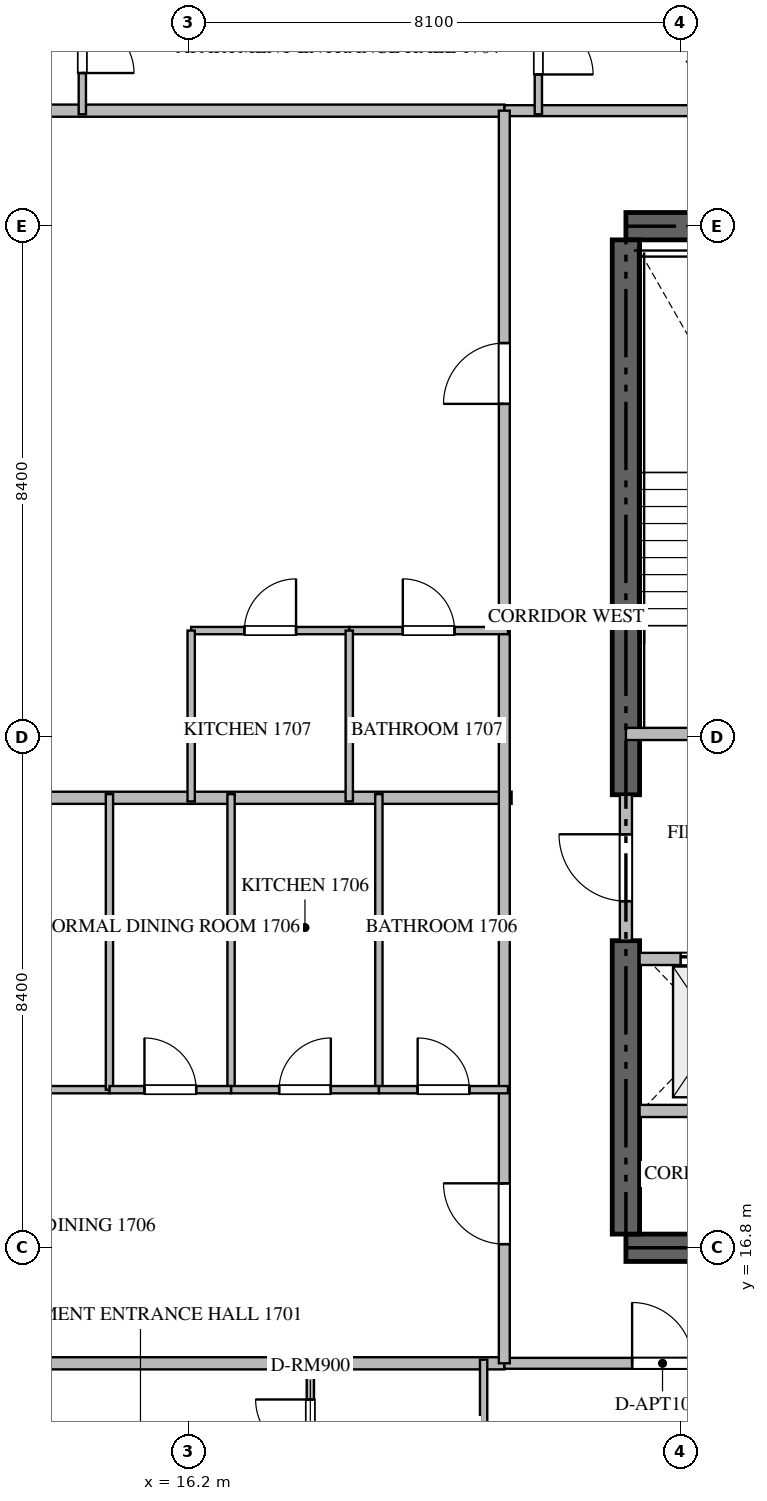
"""IFC4 building model, lengths in metres.
Left out: names, types, materials, properties, quantities, classifications, styles, units other than length and angle.
Written with IfcOpenShell. Run it as: python <this file> out.ifc"""

import sys

from ifc_helpers import new_model, si_unit, direction, frame, frame_2d, origin, place, context, subcontext, project, spatial, rectangle, extrude, source, transform, mapped, element, fill, save


model = new_model("IFC4")
c1 = context("Model", 3, precision=1e-05, world=origin(), true_north=direction((0.0, 1.0)))
c2 = subcontext(c1, "Body", "Model", "MODEL_VIEW")
j1 = project(units=[si_unit("LENGTHUNIT", "METRE"), si_unit("PLANEANGLEUNIT", "RADIAN")], contexts=[c1])
p1 = place(None, origin())
s1 = spatial("IfcSite", under=j1, at=p1, CompositionType="ELEMENT")
p2 = place(p1, origin())
s2 = spatial("IfcBuilding", under=s1, at=p2, CompositionType="ELEMENT")
p3 = place(p2, frame((0.0, 0.0, 71.7)))
s3 = spatial("IfcBuildingStorey", under=s2, at=p3, CompositionType="ELEMENT", Elevation=71.7)
for number, where, z_axis, x_axis in (
    (1, (23.4, 16.8, -0.26), (0.0, 0.0, 1.0), (1.0, 0.0, 0.0)),
    (2, (41.4, 33.6, -0.26), (0.0, 0.0, 1.0), (-1.0, 0.0, 0.0)),
):
    element("IfcWall", number, at=place(p3, frame(where, z_axis=z_axis, x_axis=x_axis)), inside=s3, PredefinedType="SHEAR", context=c2, shape_type="SweptSolid", body=[
        extrude(rectangle(XDim=18.0, YDim=0.45, at=frame_2d((9.0, 0.0))), origin(), (0.0, 0.0, 1.0), 3.748),
    ])
p4 = place(p3, frame((23.4, 17.025, -0.26), z_axis=(0.0, 0.0, 1.0), x_axis=(0.0, 1.0, 0.0)))
e3 = element("IfcWall", 3, at=p4, inside=s3, PredefinedType="SHEAR", context=c2, shape_type="SweptSolid", body=[
    extrude(rectangle(XDim=4.825, YDim=0.45, at=frame_2d((2.413, 0.0))), origin(), (0.0, 0.0, 1.0), 3.748),
])
p5 = place(p3, frame((23.4, 24.25, -0.26), z_axis=(0.0, 0.0, 1.0), x_axis=(0.0, 1.0, 0.0)))
e4 = element("IfcWall", 4, at=p5, inside=s3, PredefinedType="SHEAR", context=c2, shape_type="SweptSolid", body=[
    extrude(rectangle(XDim=9.125, YDim=0.45, at=frame_2d((4.562, 0.0))), origin(), (0.0, 0.0, 1.0), 3.748),
])
p6 = place(p3, frame((23.4, 25.25, 0.0), z_axis=(0.0, 0.0, 1.0), x_axis=(1.0, 0.0, 0.0)))
e5 = element("IfcWall", 5, at=p6, inside=s3, PredefinedType="STANDARD", context=c2, shape_type="SweptSolid", body=[
    extrude(rectangle(XDim=4.45, YDim=0.2, at=frame_2d((2.225, 0.0))), origin(), (0.0, 0.0, 1.0), 3.49),
])
p7 = place(p6, frame((1.65, 0.0, 0.0)))
e6 = element("IfcOpeningElement", 6, at=p7, cuts=e5, PredefinedType="OPENING", context=c2, shape_type="SweptSolid", body=[
    extrude(rectangle(XDim=1.1, YDim=2.15, at=frame_2d((0.55, 1.075))), frame((0.0, 0.11, 0.0), z_axis=(0.0, -1.0, 0.0), x_axis=(1.0, 0.0, 0.0)), (0.0, 0.0, 1.0), 0.22),
])
p8 = place(p3, frame((23.625, 21.55, 0.0), z_axis=(0.0, 0.0, 1.0), x_axis=(1.0, 0.0, 0.0)))
e7 = element("IfcWall", 7, at=p8, inside=s3, PredefinedType="STANDARD", context=c2, shape_type="SweptSolid", body=[
    extrude(rectangle(XDim=2.425, YDim=0.2, at=frame_2d((1.212, 0.0))), origin(), (0.0, 0.0, 1.0), 3.49),
])
p9 = place(p8, frame((0.675, 0.0, 0.0)))
e8 = element("IfcOpeningElement", 8, at=p9, cuts=e7, PredefinedType="OPENING", context=c2, shape_type="SweptSolid", body=[
    extrude(rectangle(XDim=1.2, YDim=2.2, at=frame_2d((0.6, 1.1))), frame((0.0, 0.11, 0.0), z_axis=(0.0, -1.0, 0.0), x_axis=(1.0, 0.0, 0.0)), (0.0, 0.0, 1.0), 0.22),
])
p10 = place(p3, frame((23.625, 19.05, 0.0), z_axis=(0.0, 0.0, 1.0), x_axis=(1.0, 0.0, 0.0)))
e9 = element("IfcWall", 9, at=p10, inside=s3, PredefinedType="STANDARD", context=c2, shape_type="SweptSolid", body=[
    extrude(rectangle(XDim=2.425, YDim=0.2, at=frame_2d((1.212, 0.0))), origin(), (0.0, 0.0, 1.0), 3.49),
])
p11 = place(p3, frame((23.4, 21.852, 0.0), z_axis=(0.0, 0.0, 1.0), x_axis=(0.0, 1.0, 0.0)))
e10 = element("IfcWall", 10, at=p11, inside=s3, PredefinedType="STANDARD", context=c2, shape_type="SweptSolid", body=[
    extrude(rectangle(XDim=2.396, YDim=0.2, at=frame_2d((1.198, 0.0))), origin(), (0.0, 0.0, 1.0), 3.49),
])
p12 = place(p11, frame((0.648, 0.0, 0.0)))
e11 = element("IfcOpeningElement", 11, at=p12, cuts=e10, PredefinedType="OPENING", context=c2, shape_type="SweptSolid", body=[
    extrude(rectangle(XDim=1.1, YDim=2.15, at=frame_2d((0.55, 1.075))), frame((0.0, 0.11, 0.0), z_axis=(0.0, -1.0, 0.0), x_axis=(1.0, 0.0, 0.0)), (0.0, 0.0, 1.0), 0.22),
])
p13 = place(p3, frame((6.082, 24.2, 0.0), z_axis=(0.0, 0.0, 1.0), x_axis=(1.0, 0.0, 0.0)))
e12 = element("IfcWall", 12, at=p13, inside=s3, PredefinedType="PARTITIONING", context=c2, shape_type="SweptSolid", body=[
    extrude(rectangle(XDim=15.438, YDim=0.2, at=frame_2d((7.719, 0.0))), origin(), (0.0, 0.0, 1.0), 3.49),
])
for number, where, z_axis, x_axis in (
    (13, (6.082, 14.9, 0.0), (0.0, 0.0, 1.0), (1.0, 0.0, 0.0)),
    (14, (6.082, 35.5, 0.0), (0.0, 0.0, 1.0), (1.0, 0.0, 0.0)),
):
    element("IfcWall", number, at=place(p3, frame(where, z_axis=z_axis, x_axis=x_axis)), inside=s3, PredefinedType="PARTITIONING", context=c2, shape_type="SweptSolid", body=[
        extrude(rectangle(XDim=15.318, YDim=0.2, at=frame_2d((7.659, 0.0))), origin(), (0.0, 0.0, 1.0), 3.49),
    ])
p14 = place(p3, frame((21.402, 14.9, 0.0), z_axis=(0.0, 0.0, 1.0), x_axis=(1.0, 0.0, 0.0)))
e15 = element("IfcWall", 15, at=p14, inside=s3, PredefinedType="PARTITIONING", context=c2, shape_type="SweptSolid", body=[
    extrude(rectangle(XDim=21.996, YDim=0.18, at=frame_2d((10.998, 0.0))), origin(), (0.0, 0.0, 1.0), 3.49),
])
p15 = place(p14, frame((2.1, 0.0, 0.0)))
e16 = element("IfcOpeningElement", 16, at=p15, cuts=e15, PredefinedType="OPENING", context=c2, shape_type="SweptSolid", body=[
    extrude(rectangle(XDim=1.0, YDim=2.15, at=frame_2d((0.5, 1.075))), frame((0.0, 0.1, 0.0), z_axis=(0.0, -1.0, 0.0), x_axis=(1.0, 0.0, 0.0)), (0.0, 0.0, 1.0), 0.2),
])
p16 = place(p14, frame((6.173, 0.0, 0.0)))
e17 = element("IfcOpeningElement", 17, at=p16, cuts=e15, PredefinedType="OPENING", context=c2, shape_type="SweptSolid", body=[
    extrude(rectangle(XDim=1.0, YDim=2.15, at=frame_2d((0.5, 1.075))), frame((0.0, 0.1, 0.0), z_axis=(0.0, -1.0, 0.0), x_axis=(1.0, 0.0, 0.0)), (0.0, 0.0, 1.0), 0.2),
])
p17 = place(p14, frame((18.896, 0.0, 0.0)))
e18 = element("IfcOpeningElement", 18, at=p17, cuts=e15, PredefinedType="OPENING", context=c2, shape_type="SweptSolid", body=[
    extrude(rectangle(XDim=1.0, YDim=2.15, at=frame_2d((0.5, 1.075))), frame((0.0, 0.1, 0.0), z_axis=(0.0, -1.0, 0.0), x_axis=(1.0, 0.0, 0.0)), (0.0, 0.0, 1.0), 0.2),
])
p18 = place(p3, frame((21.402, 35.5, 0.0), z_axis=(0.0, 0.0, 1.0), x_axis=(1.0, 0.0, 0.0)))
e19 = element("IfcWall", 19, at=p18, inside=s3, PredefinedType="PARTITIONING", context=c2, shape_type="SweptSolid", body=[
    extrude(rectangle(XDim=21.996, YDim=0.18, at=frame_2d((10.998, 0.0))), origin(), (0.0, 0.0, 1.0), 3.49),
])
p19 = place(p18, frame((5.774, 0.0, 0.0)))
e20 = element("IfcOpeningElement", 20, at=p19, cuts=e19, PredefinedType="OPENING", context=c2, shape_type="SweptSolid", body=[
    extrude(rectangle(XDim=1.0, YDim=2.15, at=frame_2d((0.5, 1.075))), frame((0.0, 0.1, 0.0), z_axis=(0.0, -1.0, 0.0), x_axis=(1.0, 0.0, 0.0)), (0.0, 0.0, 1.0), 0.2),
])
p20 = place(p18, frame((16.272, 0.0, 0.0)))
e21 = element("IfcOpeningElement", 21, at=p20, cuts=e19, PredefinedType="OPENING", context=c2, shape_type="SweptSolid", body=[
    extrude(rectangle(XDim=1.0, YDim=2.15, at=frame_2d((0.5, 1.075))), frame((0.0, 0.1, 0.0), z_axis=(0.0, -1.0, 0.0), x_axis=(1.0, 0.0, 0.0)), (0.0, 0.0, 1.0), 0.2),
])
p21 = place(p3, frame((21.4, 14.9, 0.0), z_axis=(0.0, 0.0, 1.0), x_axis=(0.0, 1.0, 0.0)))
e22 = element("IfcWall", 22, at=p21, inside=s3, PredefinedType="PARTITIONING", context=c2, shape_type="SweptSolid", body=[
    extrude(rectangle(XDim=20.6, YDim=0.18, at=frame_2d((10.3, 0.0))), origin(), (0.0, 0.0, 1.0), 3.49),
])
p22 = place(p21, frame((1.96, 0.0, 0.0)))
e23 = element("IfcOpeningElement", 23, at=p22, cuts=e22, PredefinedType="OPENING", context=c2, shape_type="SweptSolid", body=[
    extrude(rectangle(XDim=1.0, YDim=2.15, at=frame_2d((0.5, 1.075))), frame((0.0, 0.1, 0.0), z_axis=(0.0, -1.0, 0.0), x_axis=(1.0, 0.0, 0.0)), (0.0, 0.0, 1.0), 0.2),
])
p23 = place(p21, frame((15.778, 0.0, 0.0)))
e24 = element("IfcOpeningElement", 24, at=p23, cuts=e22, PredefinedType="OPENING", context=c2, shape_type="SweptSolid", body=[
    extrude(rectangle(XDim=1.0, YDim=2.15, at=frame_2d((0.5, 1.075))), frame((0.0, 0.1, 0.0), z_axis=(0.0, -1.0, 0.0), x_axis=(1.0, 0.0, 0.0)), (0.0, 0.0, 1.0), 0.2),
])
p24 = place(p3, frame((21.06, 12.15, 0.0), z_axis=(0.0, 0.0, 1.0), x_axis=(0.0, 1.0, 0.0)))
e25 = element("IfcWall", 25, at=p24, inside=s3, PredefinedType="PARTITIONING", context=c2, shape_type="SweptSolid", body=[
    extrude(rectangle(XDim=2.81, YDim=0.12, at=frame_2d((1.405, 0.0))), origin(), (0.0, 0.0, 1.0), 3.49),
])
p25 = place(p3, frame((18.21, 12.75, 0.0), z_axis=(0.0, 0.0, 1.0), x_axis=(0.0, 1.0, 0.0)))
e26 = element("IfcWall", 26, at=p25, inside=s3, PredefinedType="PARTITIONING", context=c2, shape_type="SweptSolid", body=[
    extrude(rectangle(XDim=2.21, YDim=0.12, at=frame_2d((1.105, 0.0))), origin(), (0.0, 0.0, 1.0), 3.49),
])
p26 = place(p25, frame((0.655, 0.0, 0.0)))
e27 = element("IfcOpeningElement", 27, at=p26, cuts=e26, PredefinedType="OPENING", context=c2, shape_type="SweptSolid", body=[
    extrude(rectangle(XDim=0.9, YDim=2.1, at=frame_2d((0.45, 1.05))), frame((0.0, 0.07, 0.0), z_axis=(0.0, -1.0, 0.0), x_axis=(1.0, 0.0, 0.0)), (0.0, 0.0, 1.0), 0.14),
])
p27 = place(p3, frame((21.96, 37.65, 0.0), z_axis=(0.0, 0.0, 1.0), x_axis=(0.0, -1.0, 0.0)))
e28 = element("IfcWall", 28, at=p27, inside=s3, PredefinedType="PARTITIONING", context=c2, shape_type="SweptSolid", body=[
    extrude(rectangle(XDim=2.21, YDim=0.12, at=frame_2d((1.105, 0.0))), origin(), (0.0, 0.0, 1.0), 3.49),
])
p28 = place(p27, frame((0.655, 0.0, 0.0)))
e29 = element("IfcOpeningElement", 29, at=p28, cuts=e28, PredefinedType="OPENING", context=c2, shape_type="SweptSolid", body=[
    extrude(rectangle(XDim=0.9, YDim=2.1, at=frame_2d((0.45, 1.05))), frame((0.0, 0.07, 0.0), z_axis=(0.0, -1.0, 0.0), x_axis=(1.0, 0.0, 0.0)), (0.0, 0.0, 1.0), 0.14),
])
p29 = place(p3, frame((14.46, 37.648, 0.0), z_axis=(0.0, 0.0, 1.0), x_axis=(0.0, -1.0, 0.0)))
e30 = element("IfcWall", 30, at=p29, inside=s3, PredefinedType="PARTITIONING", context=c2, shape_type="SweptSolid", body=[
    extrude(rectangle(XDim=2.208, YDim=0.12, at=frame_2d((1.104, 0.0))), origin(), (0.0, 0.0, 1.0), 3.49),
])
p30 = place(p29, frame((0.679, 0.0, 0.0)))
e31 = element("IfcOpeningElement", 31, at=p30, cuts=e30, PredefinedType="OPENING", context=c2, shape_type="SweptSolid", body=[
    extrude(rectangle(XDim=0.85, YDim=2.1, at=frame_2d((0.425, 1.05))), frame((0.0, 0.07, 0.0), z_axis=(0.0, -1.0, 0.0), x_axis=(1.0, 0.0, 0.0)), (0.0, 0.0, 1.0), 0.14),
])
p31 = place(p3, frame((6.095, 19.4, 0.0), z_axis=(0.0, 0.0, 1.0), x_axis=(1.0, 0.0, 0.0)))
e32 = element("IfcWall", 32, at=p31, inside=s3, PredefinedType="PARTITIONING", context=c2, shape_type="SweptSolid", body=[
    extrude(rectangle(XDim=8.811, YDim=0.12, at=frame_2d((4.406, 0.0))), origin(), (0.0, 0.0, 1.0), 3.49),
])
p32 = place(p31, frame((4.351, 0.0, 0.0)))
e33 = element("IfcOpeningElement", 33, at=p32, cuts=e32, PredefinedType="OPENING", context=c2, shape_type="SweptSolid", body=[
    extrude(rectangle(XDim=0.9, YDim=2.1, at=frame_2d((0.45, 1.05))), frame((0.0, 0.07, 0.0), z_axis=(0.0, -1.0, 0.0), x_axis=(1.0, 0.0, 0.0)), (0.0, 0.0, 1.0), 0.14),
])
for number, where, z_axis, x_axis in (
    (34, (14.906, 19.4, 0.0), (0.0, 0.0, 1.0), (0.0, 1.0, 0.0)),
    (35, (16.906, 19.4, 0.0), (0.0, 0.0, 1.0), (0.0, 1.0, 0.0)),
    (36, (19.337, 19.4, 0.0), (0.0, 0.0, 1.0), (0.0, 1.0, 0.0)),
):
    element("IfcWall", number, at=place(p3, frame(where, z_axis=z_axis, x_axis=x_axis)), inside=s3, PredefinedType="PARTITIONING", context=c2, shape_type="SweptSolid", body=[
        extrude(rectangle(XDim=4.86, YDim=0.12, at=frame_2d((2.43, 0.0))), origin(), (0.0, 0.0, 1.0), 3.49),
    ])
p33 = place(p3, frame((14.908, 19.4, 0.0), z_axis=(0.0, 0.0, 1.0), x_axis=(1.0, 0.0, 0.0)))
e37 = element("IfcWall", 37, at=p33, inside=s3, PredefinedType="PARTITIONING", context=c2, shape_type="SweptSolid", body=[
    extrude(rectangle(XDim=1.998, YDim=0.12, at=frame_2d((0.999, 0.0))), origin(), (0.0, 0.0, 1.0), 3.49),
])
p34 = place(p33, frame((0.574, 0.0, 0.0)))
e38 = element("IfcOpeningElement", 38, at=p34, cuts=e37, PredefinedType="OPENING", context=c2, shape_type="SweptSolid", body=[
    extrude(rectangle(XDim=0.85, YDim=2.1, at=frame_2d((0.425, 1.05))), frame((0.0, 0.07, 0.0), z_axis=(0.0, -1.0, 0.0), x_axis=(1.0, 0.0, 0.0)), (0.0, 0.0, 1.0), 0.14),
])
p35 = place(p3, frame((16.908, 19.4, 0.0), z_axis=(0.0, 0.0, 1.0), x_axis=(1.0, 0.0, 0.0)))
e39 = element("IfcWall", 39, at=p35, inside=s3, PredefinedType="PARTITIONING", context=c2, shape_type="SweptSolid", body=[
    extrude(rectangle(XDim=2.429, YDim=0.12, at=frame_2d((1.214, 0.0))), origin(), (0.0, 0.0, 1.0), 3.49),
])
p36 = place(p35, frame((0.789, 0.0, 0.0)))
e40 = element("IfcOpeningElement", 40, at=p36, cuts=e39, PredefinedType="OPENING", context=c2, shape_type="SweptSolid", body=[
    extrude(rectangle(XDim=0.85, YDim=2.1, at=frame_2d((0.425, 1.05))), frame((0.0, 0.07, 0.0), z_axis=(0.0, -1.0, 0.0), x_axis=(1.0, 0.0, 0.0)), (0.0, 0.0, 1.0), 0.14),
])
p37 = place(p3, frame((19.339, 19.4, 0.0), z_axis=(0.0, 0.0, 1.0), x_axis=(1.0, 0.0, 0.0)))
e41 = element("IfcWall", 41, at=p37, inside=s3, PredefinedType="PARTITIONING", context=c2, shape_type="SweptSolid", body=[
    extrude(rectangle(XDim=2.121, YDim=0.12, at=frame_2d((1.061, 0.0))), origin(), (0.0, 0.0, 1.0), 3.49),
])
p38 = place(p37, frame((0.636, 0.0, 0.0)))
e42 = element("IfcOpeningElement", 42, at=p38, cuts=e41, PredefinedType="OPENING", context=c2, shape_type="SweptSolid", body=[
    extrude(rectangle(XDim=0.85, YDim=2.1, at=frame_2d((0.425, 1.05))), frame((0.0, 0.07, 0.0), z_axis=(0.0, -1.0, 0.0), x_axis=(1.0, 0.0, 0.0)), (0.0, 0.0, 1.0), 0.14),
])
p39 = place(p3, frame((16.25, 26.95, 0.0), z_axis=(0.0, 0.0, 1.0), x_axis=(1.0, 0.0, 0.0)))
e43 = element("IfcWall", 43, at=p39, inside=s3, PredefinedType="PARTITIONING", context=c2, shape_type="SweptSolid", body=[
    extrude(rectangle(XDim=2.6, YDim=0.12, at=frame_2d((1.3, 0.0))), origin(), (0.0, 0.0, 1.0), 3.49),
])
p40 = place(p39, frame((0.875, 0.0, 0.0)))
e44 = element("IfcOpeningElement", 44, at=p40, cuts=e43, PredefinedType="OPENING", context=c2, shape_type="SweptSolid", body=[
    extrude(rectangle(XDim=0.85, YDim=2.1, at=frame_2d((0.425, 1.05))), frame((0.0, 0.07, 0.0), z_axis=(0.0, -1.0, 0.0), x_axis=(1.0, 0.0, 0.0)), (0.0, 0.0, 1.0), 0.14),
])
p41 = place(p3, frame((18.852, 26.95, 0.0), z_axis=(0.0, 0.0, 1.0), x_axis=(1.0, 0.0, 0.0)))
e45 = element("IfcWall", 45, at=p41, inside=s3, PredefinedType="PARTITIONING", context=c2, shape_type="SweptSolid", body=[
    extrude(rectangle(XDim=2.608, YDim=0.12, at=frame_2d((1.304, 0.0))), origin(), (0.0, 0.0, 1.0), 3.49),
])
p42 = place(p41, frame((0.879, 0.0, 0.0)))
e46 = element("IfcOpeningElement", 46, at=p42, cuts=e45, PredefinedType="OPENING", context=c2, shape_type="SweptSolid", body=[
    extrude(rectangle(XDim=0.85, YDim=2.1, at=frame_2d((0.425, 1.05))), frame((0.0, 0.07, 0.0), z_axis=(0.0, -1.0, 0.0), x_axis=(1.0, 0.0, 0.0)), (0.0, 0.0, 1.0), 0.14),
])
for number, where, z_axis, x_axis in (
    (47, (18.85, 24.14, 0.0), (0.0, 0.0, 1.0), (0.0, 1.0, 0.0)),
    (48, (16.25, 24.14, 0.0), (0.0, 0.0, 1.0), (0.0, 1.0, 0.0)),
):
    element("IfcWall", number, at=place(p3, frame(where, z_axis=z_axis, x_axis=x_axis)), inside=s3, PredefinedType="PARTITIONING", context=c2, shape_type="SweptSolid", body=[
        extrude(rectangle(XDim=2.81, YDim=0.12, at=frame_2d((1.405, 0.0))), origin(), (0.0, 0.0, 1.0), 3.49),
    ])
m1 = source(origin(), c2, "Body", "SweptSolid", [
    extrude(rectangle(XDim=1.2, YDim=2.2, at=frame_2d((0.6, 1.1))), frame((0.0, 0.025, 0.0), z_axis=(0.0, -1.0, 0.0), x_axis=(1.0, 0.0, 0.0)), (0.0, 0.0, 1.0), 0.05),
])
p43 = place(p9, origin())
e49 = element("IfcDoor", 49, at=p43, inside=s3, OperationType="DOUBLE_DOOR_SLIDING", PredefinedType="DOOR", context=c2, shape_type="MappedRepresentation", body=[
    mapped(m1, transform((0.0, 0.0, 0.0), scale=1.0)),
])
fill(e8, e49)
m2 = source(origin(), c2, "Body", "SweptSolid", [
    extrude(rectangle(XDim=1.1, YDim=2.15, at=frame_2d((0.55, 1.075))), frame((0.0, 0.025, 0.0), z_axis=(0.0, -1.0, 0.0), x_axis=(1.0, 0.0, 0.0)), (0.0, 0.0, 1.0), 0.05),
])
p44 = place(p12, origin())
e50 = element("IfcDoor", 50, at=p44, inside=s3, OperationType="SINGLE_SWING_RIGHT", PredefinedType="DOOR", context=c2, shape_type="MappedRepresentation", body=[
    mapped(m2, transform((0.0, 0.0, 0.0), scale=1.0)),
])
fill(e11, e50)
m3 = source(origin(), c2, "Body", "SweptSolid", [
    extrude(rectangle(XDim=1.0, YDim=2.15, at=frame_2d((0.5, 1.075))), frame((0.0, 0.025, 0.0), z_axis=(0.0, -1.0, 0.0), x_axis=(1.0, 0.0, 0.0)), (0.0, 0.0, 1.0), 0.05),
])
p45 = place(p15, origin())
e51 = element("IfcDoor", 51, at=p45, inside=s3, OperationType="SINGLE_SWING_LEFT", PredefinedType="DOOR", context=c2, shape_type="MappedRepresentation", body=[
    mapped(m3, transform((0.0, 0.0, 0.0), scale=1.0)),
])
fill(e16, e51)
p46 = place(p22, origin())
e52 = element("IfcDoor", 52, at=p46, inside=s3, OperationType="SINGLE_SWING_RIGHT", PredefinedType="DOOR", context=c2, shape_type="MappedRepresentation", body=[
    mapped(m3, transform((0.0, 0.0, 0.0), scale=1.0)),
])
fill(e23, e52)
p47 = place(p23, origin())
e53 = element("IfcDoor", 53, at=p47, inside=s3, OperationType="SINGLE_SWING_LEFT", PredefinedType="DOOR", context=c2, shape_type="MappedRepresentation", body=[
    mapped(m3, transform((0.0, 0.0, 0.0), scale=1.0)),
])
fill(e24, e53)
m4 = source(origin(), c2, "Body", "SweptSolid", [
    extrude(rectangle(XDim=0.9, YDim=2.1, at=frame_2d((0.45, 1.05))), frame((0.0, 0.025, 0.0), z_axis=(0.0, -1.0, 0.0), x_axis=(1.0, 0.0, 0.0)), (0.0, 0.0, 1.0), 0.05),
])
p48 = place(p26, origin())
e54 = element("IfcDoor", 54, at=p48, inside=s3, OperationType="SINGLE_SWING_RIGHT", PredefinedType="DOOR", context=c2, shape_type="MappedRepresentation", body=[
    mapped(m4, transform((0.0, 0.0, 0.0), scale=1.0)),
])
fill(e27, e54)
p49 = place(p28, origin())
e55 = element("IfcDoor", 55, at=p49, inside=s3, OperationType="SINGLE_SWING_RIGHT", PredefinedType="DOOR", context=c2, shape_type="MappedRepresentation", body=[
    mapped(m4, transform((0.0, 0.0, 0.0), scale=1.0)),
])
fill(e29, e55)
m5 = source(origin(), c2, "Body", "SweptSolid", [
    extrude(rectangle(XDim=0.85, YDim=2.1, at=frame_2d((0.425, 1.05))), frame((0.0, 0.025, 0.0), z_axis=(0.0, -1.0, 0.0), x_axis=(1.0, 0.0, 0.0)), (0.0, 0.0, 1.0), 0.05),
])
p50 = place(p30, origin())
e56 = element("IfcDoor", 56, at=p50, inside=s3, OperationType="SINGLE_SWING_RIGHT", PredefinedType="DOOR", context=c2, shape_type="MappedRepresentation", body=[
    mapped(m5, transform((0.0, 0.0, 0.0), scale=1.0)),
])
fill(e31, e56)
p51 = place(p34, origin())
e57 = element("IfcDoor", 57, at=p51, inside=s3, OperationType="SINGLE_SWING_LEFT", PredefinedType="DOOR", context=c2, shape_type="MappedRepresentation", body=[
    mapped(m5, transform((0.0, 0.0, 0.0), scale=1.0)),
])
fill(e38, e57)
p52 = place(p36, origin())
e58 = element("IfcDoor", 58, at=p52, inside=s3, OperationType="SINGLE_SWING_RIGHT", PredefinedType="DOOR", context=c2, shape_type="MappedRepresentation", body=[
    mapped(m5, transform((0.0, 0.0, 0.0), scale=1.0)),
])
fill(e40, e58)
p53 = place(p38, origin())
e59 = element("IfcDoor", 59, at=p53, inside=s3, OperationType="SINGLE_SWING_LEFT", PredefinedType="DOOR", context=c2, shape_type="MappedRepresentation", body=[
    mapped(m5, transform((0.0, 0.0, 0.0), scale=1.0)),
])
fill(e42, e59)
p54 = place(p40, origin())
e60 = element("IfcDoor", 60, at=p54, inside=s3, OperationType="SINGLE_SWING_RIGHT", PredefinedType="DOOR", context=c2, shape_type="MappedRepresentation", body=[
    mapped(m5, transform((0.0, 0.0, 0.0), scale=1.0)),
])
fill(e44, e60)
p55 = place(p42, origin())
e61 = element("IfcDoor", 61, at=p55, inside=s3, OperationType="SINGLE_SWING_LEFT", PredefinedType="DOOR", context=c2, shape_type="MappedRepresentation", body=[
    mapped(m5, transform((0.0, 0.0, 0.0), scale=1.0)),
])
fill(e46, e61)
save(model, sys.argv[1])
